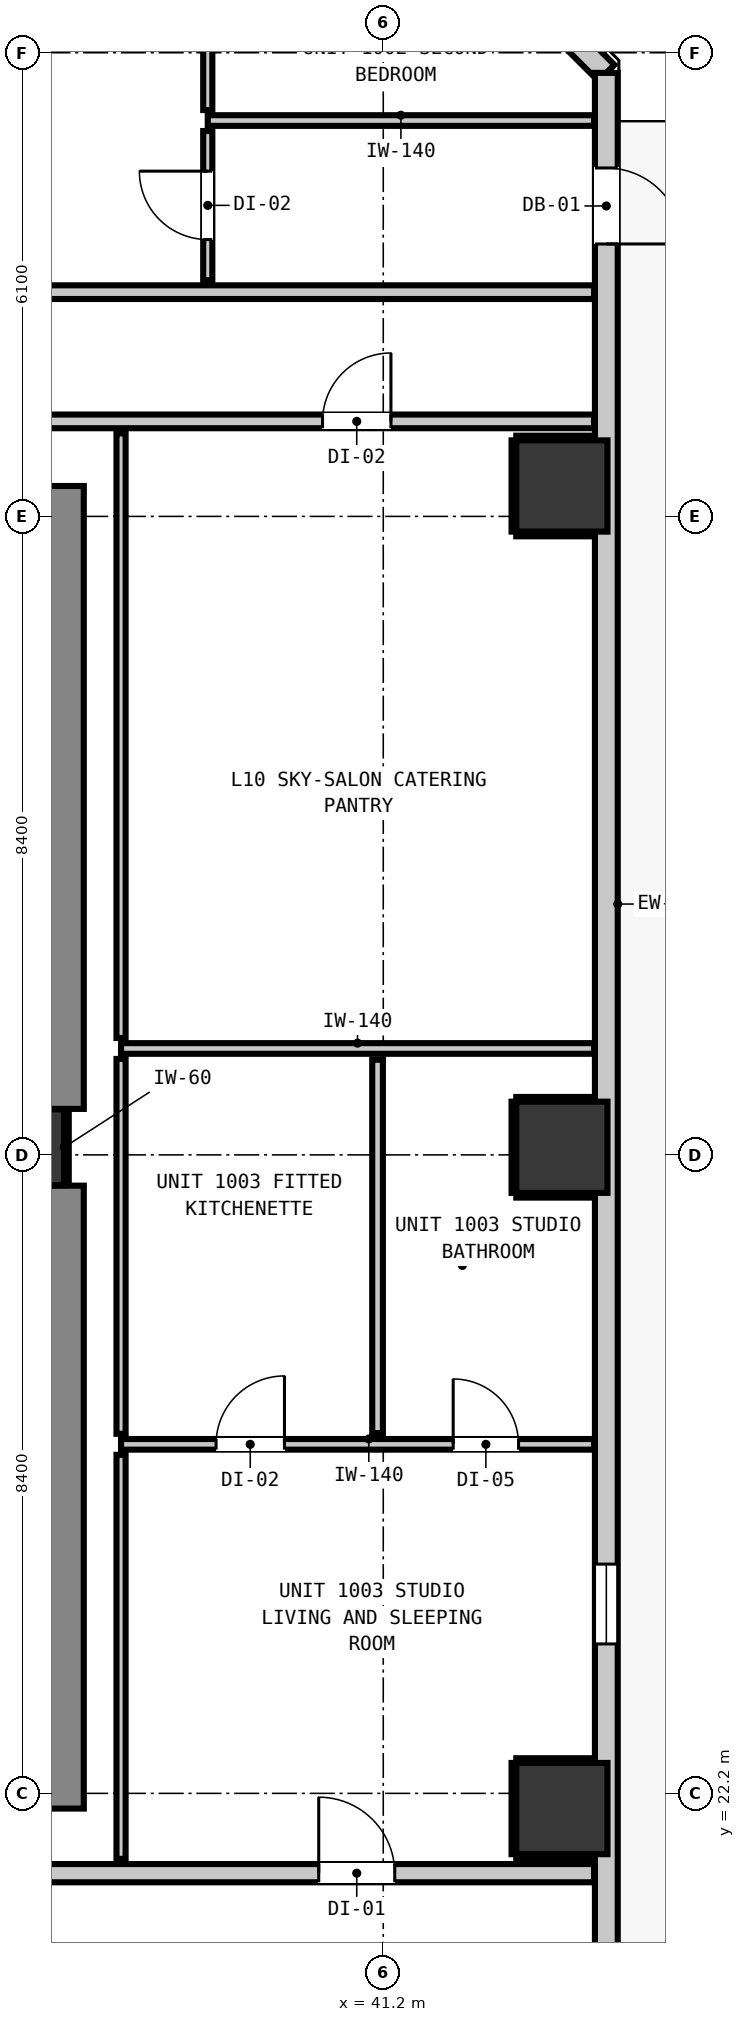
"""IFC4 building model, lengths in metres.
Left out: names, types, materials, properties, quantities, classifications, styles, units other than length and angle.
Written with IfcOpenShell. Run it as: python <this file> out.ifc"""

import sys

from ifc_helpers import new_model, si_unit, direction, frame, frame_2d, origin, origin_2d, place, context, subcontext, project, spatial, rectangle, extrude, element, fill, save


model = new_model("IFC4")
c1 = context("Model", 3, precision=1e-05, world=origin(), true_north=direction((0.0, 1.0)))
c2 = subcontext(c1, "Body", "Model", "MODEL_VIEW")
j1 = project(units=[si_unit("LENGTHUNIT", "METRE"), si_unit("PLANEANGLEUNIT", "RADIAN")], contexts=[c1])
p1 = place(None, origin())
s1 = spatial("IfcSite", under=j1, at=p1, CompositionType="ELEMENT")
p2 = place(p1, origin())
s2 = spatial("IfcBuilding", under=s1, at=p2, CompositionType="ELEMENT")
p3 = place(p2, frame((0.0, 0.0, 38.6)))
s3 = spatial("IfcBuildingStorey", under=s2, at=p3, CompositionType="ELEMENT", Elevation=38.6)
p4 = place(p3, frame((36.5, 30.7, 0.0), z_axis=(0.0, 0.0, 1.0), x_axis=(1.0, 0.0, 0.0)))
e1 = element("IfcColumn", 1, at=p4, inside=s3, PredefinedType="COLUMN", context=c2, shape_type="SweptSolid", body=[
    extrude(rectangle(XDim=1.0, YDim=1.0, at=origin_2d()), origin(), (0.0, 0.0, 1.0), 3.32),
])
p5 = place(p3, frame((36.66, 22.0, 0.0), z_axis=(0.0, 0.0, 1.0), x_axis=(0.0, 1.0, 0.0)))
e2 = element("IfcWall", 2, at=p5, inside=s3, PredefinedType="SHEAR", context=c2, shape_type="SweptSolid", body=[
    extrude(rectangle(XDim=8.195, YDim=1.2, at=frame_2d((4.098, 0.0))), origin(), (0.0, 0.0, 1.0), 3.32),
])
p6 = place(p3, frame((36.66, 31.205, 0.0), z_axis=(0.0, 0.0, 1.0), x_axis=(0.0, 1.0, 0.0)))
e3 = element("IfcWall", 3, at=p6, inside=s3, PredefinedType="SHEAR", context=c2, shape_type="SweptSolid", body=[
    extrude(rectangle(XDim=8.195, YDim=1.2, at=frame_2d((4.097, 0.0))), origin(), (0.0, 0.0, 1.0), 3.32),
])
for number, where, z_axis, x_axis in (
    (4, (43.55, 22.0, 0.0), (0.0, 0.0, 1.0), (1.0, 0.0, 0.0)),
    (5, (43.55, 30.7, 0.0), (0.0, 0.0, 1.0), (1.0, 0.0, 0.0)),
    (6, (43.55, 39.4, 0.0), (0.0, 0.0, 1.0), (1.0, 0.0, 0.0)),
):
    element("IfcColumn", number, at=place(p3, frame(where, z_axis=z_axis, x_axis=x_axis)), inside=s3, PredefinedType="COLUMN", context=c2, shape_type="SweptSolid", body=[
        extrude(rectangle(XDim=1.2, YDim=1.2, at=origin_2d()), origin(), (0.0, 0.0, 1.0), 2.9),
    ])
p7 = place(p3, frame((41.635, 47.335, 0.0), z_axis=(0.0, 0.0, 1.0), x_axis=(0.707106781187, -0.707106781187, 0.0)))
e7 = element("IfcWall", 7, at=p7, inside=s3, PredefinedType="STANDARD", context=c2, shape_type="SweptSolid", body=[
    extrude(rectangle(XDim=3.536, YDim=0.3, at=frame_2d((1.768, 0.0))), origin(), (0.0, 0.0, 1.0), 2.9),
])
p8 = place(p3, frame((44.135, 44.835, 0.0), z_axis=(0.0, 0.0, 1.0), x_axis=(0.0, -1.0, 0.0)))
e8 = element("IfcWall", 8, at=p8, inside=s3, PredefinedType="STANDARD", context=c2, shape_type="SweptSolid", body=[
    extrude(rectangle(XDim=34.67, YDim=0.3, at=frame_2d((17.335, 0.0))), origin(), (0.0, 0.0, 1.0), 2.9),
])
p9 = place(p8, frame((1.251, 0.0, 0.0)))
e9 = element("IfcOpeningElement", 9, at=p9, cuts=e8, PredefinedType="OPENING", context=c2, shape_type="SweptSolid", body=[
    extrude(rectangle(XDim=1.0, YDim=2.15, at=frame_2d((0.5, 1.075))), frame((0.0, 0.16, 0.0), z_axis=(0.0, -1.0, 0.0), x_axis=(1.0, 0.0, 0.0)), (0.0, 0.0, 1.0), 0.32),
])
p10 = place(p8, frame((29.508, 0.0, 0.85)))
e10 = element("IfcOpeningElement", 10, at=p10, cuts=e8, PredefinedType="OPENING", context=c2, shape_type="SweptSolid", body=[
    extrude(rectangle(XDim=1.05, YDim=1.65, at=frame_2d((0.525, 0.825))), frame((0.0, 0.16, 0.0), z_axis=(0.0, -1.0, 0.0), x_axis=(1.0, 0.0, 0.0)), (0.0, 0.0, 1.0), 0.32),
])
p11 = place(p8, frame((19.619, 0.0, 0.85)))
e11 = element("IfcOpeningElement", 11, at=p11, cuts=e8, PredefinedType="OPENING", context=c2, shape_type="SweptSolid", body=[
    extrude(rectangle(XDim=1.05, YDim=1.65, at=frame_2d((0.525, 0.825))), frame((0.0, 0.16, 0.0), z_axis=(0.0, -1.0, 0.0), x_axis=(1.0, 0.0, 0.0)), (0.0, 0.0, 1.0), 0.32),
])
p12 = place(p3, frame((1.827, 21.15, 0.0), z_axis=(0.0, 0.0, 1.0), x_axis=(1.0, 0.0, 0.0)))
e12 = element("IfcWall", 12, at=p12, inside=s3, PredefinedType="PARTITIONING", context=c2, shape_type="SweptSolid", body=[
    extrude(rectangle(XDim=42.146, YDim=0.24, at=frame_2d((21.073, 0.0))), origin(), (0.0, 0.0, 1.0), 2.9),
])
p13 = place(p12, frame((16.383, 0.0, 0.0)))
e13 = element("IfcOpeningElement", 13, at=p13, cuts=e12, PredefinedType="OPENING", context=c2, shape_type="SweptSolid", body=[
    extrude(rectangle(XDim=1.1, YDim=2.15, at=frame_2d((0.55, 1.075))), frame((0.0, 0.13, 0.0), z_axis=(0.0, -1.0, 0.0), x_axis=(1.0, 0.0, 0.0)), (0.0, 0.0, 1.0), 0.26),
])
p14 = place(p12, frame((8.647, 0.0, 0.0)))
e14 = element("IfcOpeningElement", 14, at=p14, cuts=e12, PredefinedType="OPENING", context=c2, shape_type="SweptSolid", body=[
    extrude(rectangle(XDim=1.4, YDim=2.15, at=frame_2d((0.7, 1.075))), frame((0.0, 0.13, 0.0), z_axis=(0.0, -1.0, 0.0), x_axis=(1.0, 0.0, 0.0)), (0.0, 0.0, 1.0), 0.26),
])
p15 = place(p12, frame((38.524, 0.0, 0.0)))
e15 = element("IfcOpeningElement", 15, at=p15, cuts=e12, PredefinedType="OPENING", context=c2, shape_type="SweptSolid", body=[
    extrude(rectangle(XDim=1.0, YDim=2.15, at=frame_2d((0.5, 1.075))), frame((0.0, 0.13, 0.0), z_axis=(0.0, -1.0, 0.0), x_axis=(1.0, 0.0, 0.0)), (0.0, 0.0, 1.0), 0.26),
])
p16 = place(p3, frame((1.827, 40.25, 0.0), z_axis=(0.0, 0.0, 1.0), x_axis=(1.0, 0.0, 0.0)))
e16 = element("IfcWall", 16, at=p16, inside=s3, PredefinedType="PARTITIONING", context=c2, shape_type="SweptSolid", body=[
    extrude(rectangle(XDim=42.146, YDim=0.18, at=frame_2d((21.073, 0.0))), origin(), (0.0, 0.0, 1.0), 2.9),
])
p17 = place(p16, frame((15.608, 0.0, 0.0)))
e17 = element("IfcOpeningElement", 17, at=p17, cuts=e16, PredefinedType="OPENING", context=c2, shape_type="SweptSolid", body=[
    extrude(rectangle(XDim=1.4, YDim=2.15, at=frame_2d((0.7, 1.075))), frame((0.0, 0.1, 0.0), z_axis=(0.0, -1.0, 0.0), x_axis=(1.0, 0.0, 0.0)), (0.0, 0.0, 1.0), 0.2),
])
p18 = place(p16, frame((8.647, 0.0, 0.0)))
e18 = element("IfcOpeningElement", 18, at=p18, cuts=e16, PredefinedType="OPENING", context=c2, shape_type="SweptSolid", body=[
    extrude(rectangle(XDim=1.4, YDim=2.15, at=frame_2d((0.7, 1.075))), frame((0.0, 0.1, 0.0), z_axis=(0.0, -1.0, 0.0), x_axis=(1.0, 0.0, 0.0)), (0.0, 0.0, 1.0), 0.2),
])
p19 = place(p16, frame((38.574, 0.0, 0.0)))
e19 = element("IfcOpeningElement", 19, at=p19, cuts=e16, PredefinedType="OPENING", context=c2, shape_type="SweptSolid", body=[
    extrude(rectangle(XDim=0.9, YDim=2.1, at=frame_2d((0.45, 1.05))), frame((0.0, 0.1, 0.0), z_axis=(0.0, -1.0, 0.0), x_axis=(1.0, 0.0, 0.0)), (0.0, 0.0, 1.0), 0.2),
])
p20 = place(p3, frame((1.827, 41.95, 0.0), z_axis=(0.0, 0.0, 1.0), x_axis=(1.0, 0.0, 0.0)))
e20 = element("IfcWall", 20, at=p20, inside=s3, PredefinedType="PARTITIONING", context=c2, shape_type="SweptSolid", body=[
    extrude(rectangle(XDim=42.146, YDim=0.18, at=frame_2d((21.073, 0.0))), origin(), (0.0, 0.0, 1.0), 2.9),
])
p21 = place(p20, frame((12.322, 0.0, 0.0)))
e21 = element("IfcOpeningElement", 21, at=p21, cuts=e20, PredefinedType="OPENING", context=c2, shape_type="SweptSolid", body=[
    extrude(rectangle(XDim=0.9, YDim=2.1, at=frame_2d((0.45, 1.05))), frame((0.0, 0.1, 0.0), z_axis=(0.0, -1.0, 0.0), x_axis=(1.0, 0.0, 0.0)), (0.0, 0.0, 1.0), 0.2),
])
p22 = place(p20, frame((19.957, 0.0, 0.0)))
e22 = element("IfcOpeningElement", 22, at=p22, cuts=e20, PredefinedType="OPENING", context=c2, shape_type="SweptSolid", body=[
    extrude(rectangle(XDim=0.9, YDim=2.1, at=frame_2d((0.45, 1.05))), frame((0.0, 0.1, 0.0), z_axis=(0.0, -1.0, 0.0), x_axis=(1.0, 0.0, 0.0)), (0.0, 0.0, 1.0), 0.2),
])
p23 = place(p20, frame((32.95, 0.0, 0.0)))
e23 = element("IfcOpeningElement", 23, at=p23, cuts=e20, PredefinedType="OPENING", context=c2, shape_type="SweptSolid", body=[
    extrude(rectangle(XDim=1.0, YDim=2.15, at=frame_2d((0.5, 1.075))), frame((0.0, 0.1, 0.0), z_axis=(0.0, -1.0, 0.0), x_axis=(1.0, 0.0, 0.0)), (0.0, 0.0, 1.0), 0.2),
])
p24 = place(p3, frame((37.75, 26.792, 0.0), z_axis=(0.0, 0.0, 1.0), x_axis=(1.0, 0.0, 0.0)))
e24 = element("IfcWall", 24, at=p24, inside=s3, PredefinedType="PARTITIONING", context=c2, shape_type="SweptSolid", body=[
    extrude(rectangle(XDim=6.223, YDim=0.14, at=frame_2d((3.111, 0.0))), origin(), (0.0, 0.0, 1.0), 2.9),
])
p25 = place(p24, frame((1.25, 0.0, 0.0)))
e25 = element("IfcOpeningElement", 25, at=p25, cuts=e24, PredefinedType="OPENING", context=c2, shape_type="SweptSolid", body=[
    extrude(rectangle(XDim=0.9, YDim=2.1, at=frame_2d((0.45, 1.05))), frame((0.0, 0.08, 0.0), z_axis=(0.0, -1.0, 0.0), x_axis=(1.0, 0.0, 0.0)), (0.0, 0.0, 1.0), 0.16),
])
p26 = place(p24, frame((4.37, 0.0, 0.0)))
e26 = element("IfcOpeningElement", 26, at=p26, cuts=e24, PredefinedType="OPENING", context=c2, shape_type="SweptSolid", body=[
    extrude(rectangle(XDim=0.86, YDim=2.02, at=frame_2d((0.43, 1.01))), frame((0.0, 0.08, 0.0), z_axis=(0.0, -1.0, 0.0), x_axis=(1.0, 0.0, 0.0)), (0.0, 0.0, 1.0), 0.16),
])
p27 = place(p3, frame((37.75, 32.0, 0.0), z_axis=(0.0, 0.0, 1.0), x_axis=(1.0, 0.0, 0.0)))
e27 = element("IfcWall", 27, at=p27, inside=s3, PredefinedType="PARTITIONING", context=c2, shape_type="SweptSolid", body=[
    extrude(rectangle(XDim=6.223, YDim=0.14, at=frame_2d((3.111, 0.0))), origin(), (0.0, 0.0, 1.0), 2.9),
])
p28 = place(p3, frame((38.891, 44.208, 0.0), z_axis=(0.0, 0.0, 1.0), x_axis=(1.0, 0.0, 0.0)))
e28 = element("IfcWall", 28, at=p28, inside=s3, PredefinedType="PARTITIONING", context=c2, shape_type="SweptSolid", body=[
    extrude(rectangle(XDim=5.082, YDim=0.14, at=frame_2d((2.541, 0.0))), origin(), (0.0, 0.0, 1.0), 2.9),
])
p29 = place(p3, frame((41.125, 26.94, 0.0), z_axis=(0.0, 0.0, 1.0), x_axis=(0.0, 1.0, 0.0)))
e29 = element("IfcWall", 29, at=p29, inside=s3, PredefinedType="PARTITIONING", context=c2, shape_type="SweptSolid", body=[
    extrude(rectangle(XDim=4.912, YDim=0.14, at=frame_2d((2.456, 0.0))), origin(), (0.0, 0.0, 1.0), 2.9),
])
p30 = place(p3, frame((37.75, 21.338, 0.0), z_axis=(0.0, 0.0, 1.0), x_axis=(0.0, 1.0, 0.0)))
e30 = element("IfcWall", 30, at=p30, inside=s3, PredefinedType="PARTITIONING", context=c2, shape_type="SweptSolid", body=[
    extrude(rectangle(XDim=5.316, YDim=0.12, at=frame_2d((2.658, 0.0))), origin(), (0.0, 0.0, 1.0), 2.9),
])
p31 = place(p3, frame((37.75, 26.93, 0.0), z_axis=(0.0, 0.0, 1.0), x_axis=(0.0, 1.0, 0.0)))
e31 = element("IfcWall", 31, at=p31, inside=s3, PredefinedType="PARTITIONING", context=c2, shape_type="SweptSolid", body=[
    extrude(rectangle(XDim=4.932, YDim=0.12, at=frame_2d((2.466, 0.0))), origin(), (0.0, 0.0, 1.0), 2.9),
])
p32 = place(p3, frame((37.75, 32.138, 0.0), z_axis=(0.0, 0.0, 1.0), x_axis=(0.0, 1.0, 0.0)))
e32 = element("IfcWall", 32, at=p32, inside=s3, PredefinedType="PARTITIONING", context=c2, shape_type="SweptSolid", body=[
    extrude(rectangle(XDim=7.954, YDim=0.12, at=frame_2d((3.977, 0.0))), origin(), (0.0, 0.0, 1.0), 2.9),
])
p33 = place(p3, frame((38.891, 42.108, 0.0), z_axis=(0.0, 0.0, 1.0), x_axis=(0.0, 1.0, 0.0)))
e33 = element("IfcWall", 33, at=p33, inside=s3, PredefinedType="PARTITIONING", context=c2, shape_type="SweptSolid", body=[
    extrude(rectangle(XDim=1.962, YDim=0.12, at=frame_2d((0.981, 0.0))), origin(), (0.0, 0.0, 1.0), 2.9),
])
p34 = place(p33, frame((0.534, 0.0, 0.0)))
e34 = element("IfcOpeningElement", 34, at=p34, cuts=e33, PredefinedType="OPENING", context=c2, shape_type="SweptSolid", body=[
    extrude(rectangle(XDim=0.9, YDim=2.1, at=frame_2d((0.45, 1.05))), frame((0.0, 0.07, 0.0), z_axis=(0.0, -1.0, 0.0), x_axis=(1.0, 0.0, 0.0)), (0.0, 0.0, 1.0), 0.14),
])
p35 = place(p3, frame((38.891, 44.346, 0.0), z_axis=(0.0, 0.0, 1.0), x_axis=(0.0, 1.0, 0.0)))
e35 = element("IfcWall", 35, at=p35, inside=s3, PredefinedType="PARTITIONING", context=c2, shape_type="SweptSolid", body=[
    extrude(rectangle(XDim=2.827, YDim=0.12, at=frame_2d((1.414, 0.0))), origin(), (0.0, 0.0, 1.0), 2.9),
])
p36 = place(p35, frame((0.895, 0.0, 0.0)))
e36 = element("IfcOpeningElement", 36, at=p36, cuts=e35, PredefinedType="OPENING", context=c2, shape_type="SweptSolid", body=[
    extrude(rectangle(XDim=0.9, YDim=2.1, at=frame_2d((0.45, 1.05))), frame((0.0, 0.07, 0.0), z_axis=(0.0, -1.0, 0.0), x_axis=(1.0, 0.0, 0.0)), (0.0, 0.0, 1.0), 0.14),
])
p37 = place(p3, frame((37.032, 30.21, 0.0), z_axis=(0.0, 0.0, 1.0), x_axis=(0.0, 1.0, 0.0)))
e37 = element("IfcWall", 37, at=p37, inside=s3, PredefinedType="PARTITIONING", context=c2, shape_type="SweptSolid", body=[
    extrude(rectangle(XDim=0.98, YDim=0.06, at=frame_2d((0.49, 0.0))), origin(), (0.0, 0.0, 1.0), 0.905),
])
for number, where, z_axis, x_axis in (
    (38, (42.95, 21.368, 0.0), (0.0, 0.0, 1.0), (1.0, 0.0, 0.0)),
    (39, (42.95, 22.632, 0.0), (0.0, 0.0, 1.0), (1.0, 0.0, 0.0)),
):
    element("IfcWall", number, at=place(p3, frame(where, z_axis=z_axis, x_axis=x_axis)), inside=s3, PredefinedType="PARTITIONING", context=c2, shape_type="SweptSolid", body=[
        extrude(rectangle(XDim=1.02, YDim=0.06, at=frame_2d((0.51, 0.0))), origin(), (0.0, 0.0, 1.0), 0.905),
    ])
p38 = place(p3, frame((42.918, 21.4, 0.0), z_axis=(0.0, 0.0, 1.0), x_axis=(0.0, 1.0, 0.0)))
e40 = element("IfcWall", 40, at=p38, inside=s3, PredefinedType="PARTITIONING", context=c2, shape_type="SweptSolid", body=[
    extrude(rectangle(XDim=1.2, YDim=0.06, at=frame_2d((0.6, 0.0))), origin(), (0.0, 0.0, 1.0), 1.45),
])
for number, where, z_axis, x_axis in (
    (41, (42.95, 30.068, 0.0), (0.0, 0.0, 1.0), (1.0, 0.0, 0.0)),
    (42, (42.95, 31.332, 0.0), (0.0, 0.0, 1.0), (1.0, 0.0, 0.0)),
):
    element("IfcWall", number, at=place(p3, frame(where, z_axis=z_axis, x_axis=x_axis)), inside=s3, PredefinedType="PARTITIONING", context=c2, shape_type="SweptSolid", body=[
        extrude(rectangle(XDim=1.02, YDim=0.06, at=frame_2d((0.51, 0.0))), origin(), (0.0, 0.0, 1.0), 0.905),
    ])
p39 = place(p3, frame((42.918, 30.1, 0.0), z_axis=(0.0, 0.0, 1.0), x_axis=(0.0, 1.0, 0.0)))
e43 = element("IfcWall", 43, at=p39, inside=s3, PredefinedType="PARTITIONING", context=c2, shape_type="SweptSolid", body=[
    extrude(rectangle(XDim=1.2, YDim=0.06, at=frame_2d((0.6, 0.0))), origin(), (0.0, 0.0, 1.0), 1.45),
])
for number, where, z_axis, x_axis in (
    (44, (42.95, 38.768, 0.0), (0.0, 0.0, 1.0), (1.0, 0.0, 0.0)),
    (45, (42.95, 40.032, 0.0), (0.0, 0.0, 1.0), (1.0, 0.0, 0.0)),
):
    element("IfcWall", number, at=place(p3, frame(where, z_axis=z_axis, x_axis=x_axis)), inside=s3, PredefinedType="PARTITIONING", context=c2, shape_type="SweptSolid", body=[
        extrude(rectangle(XDim=1.02, YDim=0.06, at=frame_2d((0.51, 0.0))), origin(), (0.0, 0.0, 1.0), 0.905),
    ])
p40 = place(p3, frame((42.918, 38.8, 0.0), z_axis=(0.0, 0.0, 1.0), x_axis=(0.0, 1.0, 0.0)))
e46 = element("IfcWall", 46, at=p40, inside=s3, PredefinedType="PARTITIONING", context=c2, shape_type="SweptSolid", body=[
    extrude(rectangle(XDim=1.2, YDim=0.06, at=frame_2d((0.6, 0.0))), origin(), (0.0, 0.0, 1.0), 1.45),
])
p41 = place(p9, origin())
e47 = element("IfcDoor", 47, at=p41, inside=s3, OperationType="SINGLE_SWING_RIGHT", PredefinedType="DOOR", context=c2, shape_type="SweptSolid", body=[
    extrude(rectangle(XDim=1.0, YDim=2.15, at=frame_2d((0.5, 1.075))), frame((0.0, 0.025, 0.0), z_axis=(0.0, -1.0, 0.0), x_axis=(1.0, 0.0, 0.0)), (0.0, 0.0, 1.0), 0.05),
])
fill(e9, e47)
p42 = place(p11, origin())
e48 = element("IfcWindow", 48, at=p42, inside=s3, PartitioningType="SINGLE_PANEL", PredefinedType="WINDOW", context=c2, shape_type="SweptSolid", body=[
    extrude(rectangle(XDim=1.05, YDim=1.65, at=frame_2d((0.525, 0.825))), frame((0.0, 0.03, 0.0), z_axis=(0.0, -1.0, 0.0), x_axis=(1.0, 0.0, 0.0)), (0.0, 0.0, 1.0), 0.06),
])
fill(e11, e48)
p43 = place(p34, origin())
e49 = element("IfcDoor", 49, at=p43, inside=s3, OperationType="SINGLE_SWING_RIGHT", PredefinedType="DOOR", context=c2, shape_type="SweptSolid", body=[
    extrude(rectangle(XDim=0.9, YDim=2.1, at=frame_2d((0.45, 1.05))), frame((0.0, 0.025, 0.0), z_axis=(0.0, -1.0, 0.0), x_axis=(1.0, 0.0, 0.0)), (0.0, 0.0, 1.0), 0.05),
])
fill(e34, e49)
p44 = place(p15, origin())
e50 = element("IfcDoor", 50, at=p44, inside=s3, OperationType="SINGLE_SWING_LEFT", PredefinedType="DOOR", context=c2, shape_type="SweptSolid", body=[
    extrude(rectangle(XDim=1.0, YDim=2.15, at=frame_2d((0.5, 1.075))), frame((0.0, 0.025, 0.0), z_axis=(0.0, -1.0, 0.0), x_axis=(1.0, 0.0, 0.0)), (0.0, 0.0, 1.0), 0.05),
])
fill(e15, e50)
p45 = place(p25, origin())
e51 = element("IfcDoor", 51, at=p45, inside=s3, OperationType="SINGLE_SWING_RIGHT", PredefinedType="DOOR", context=c2, shape_type="SweptSolid", body=[
    extrude(rectangle(XDim=0.9, YDim=2.1, at=frame_2d((0.45, 1.05))), frame((0.0, 0.025, 0.0), z_axis=(0.0, -1.0, 0.0), x_axis=(1.0, 0.0, 0.0)), (0.0, 0.0, 1.0), 0.05),
])
fill(e25, e51)
p46 = place(p26, origin())
e52 = element("IfcDoor", 52, at=p46, inside=s3, OperationType="SINGLE_SWING_LEFT", PredefinedType="DOOR", context=c2, shape_type="SweptSolid", body=[
    extrude(rectangle(XDim=0.86, YDim=2.02, at=frame_2d((0.43, 1.01))), frame((0.0, 0.025, 0.0), z_axis=(0.0, -1.0, 0.0), x_axis=(1.0, 0.0, 0.0)), (0.0, 0.0, 1.0), 0.05),
])
fill(e26, e52)
p47 = place(p19, origin())
e53 = element("IfcDoor", 53, at=p47, inside=s3, OperationType="SINGLE_SWING_RIGHT", PredefinedType="DOOR", context=c2, shape_type="SweptSolid", body=[
    extrude(rectangle(XDim=0.9, YDim=2.1, at=frame_2d((0.45, 1.05))), frame((0.0, 0.025, 0.0), z_axis=(0.0, -1.0, 0.0), x_axis=(1.0, 0.0, 0.0)), (0.0, 0.0, 1.0), 0.05),
])
fill(e19, e53)
save(model, sys.argv[1])
